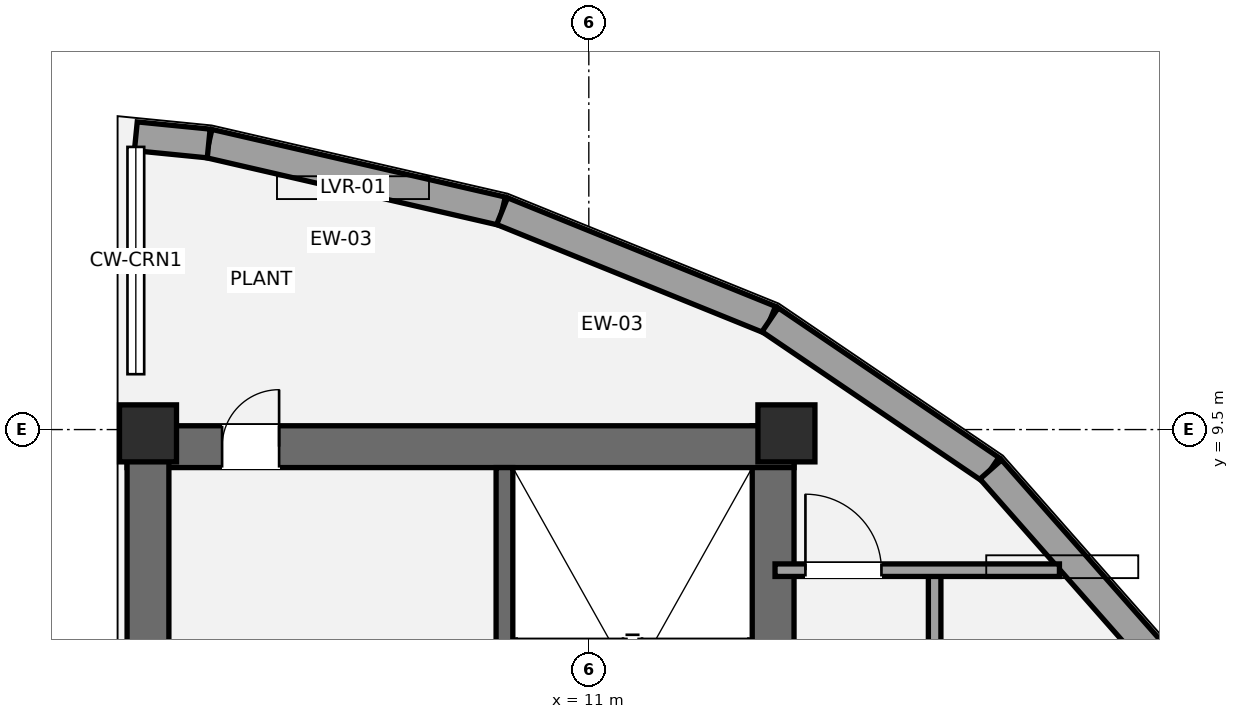
"""IFC4 building model, lengths in metres.
Left out: names, types, materials, properties, quantities, classifications, styles, units other than length and angle.
Written with IfcOpenShell. Run it as: python <this file> out.ifc"""

import sys

from ifc_helpers import new_model, si_unit, direction, frame, frame_2d, origin, origin_2d, place, context, subcontext, project, spatial, rectangle, extrude, element, fill, save


model = new_model("IFC4")
c1 = context("Model", 3, precision=1e-05, world=origin(), true_north=direction((0.0, 1.0)))
c2 = subcontext(c1, "Body", "Model", "MODEL_VIEW")
j1 = project(units=[si_unit("LENGTHUNIT", "METRE"), si_unit("PLANEANGLEUNIT", "RADIAN")], contexts=[c1])
p1 = place(None, origin())
s1 = spatial("IfcSite", under=j1, at=p1, CompositionType="ELEMENT")
p2 = place(p1, origin())
s2 = spatial("IfcBuilding", under=s1, at=p2, CompositionType="ELEMENT")
p3 = place(p2, frame((0.0, 0.0, 276.8)))
s3 = spatial("IfcBuildingStorey", under=s2, at=p3, CompositionType="ELEMENT", Elevation=276.8)
p4 = place(p3, frame((13.425, 1.3, 0.0), z_axis=(0.0, 0.0, 1.0), x_axis=(0.0, 1.0, 0.0)))
e1 = element("IfcWall", 1, at=p4, inside=s3, PredefinedType="SHEAR", context=c2, shape_type="SweptSolid", body=[
    extrude(rectangle(XDim=8.25, YDim=0.55, at=frame_2d((4.125, 0.0))), origin(), (0.0, 0.0, 1.0), 3.8),
])
p5 = place(p3, frame((4.925, 9.275, 0.0), z_axis=(0.0, 0.0, 1.0), x_axis=(1.0, 0.0, 0.0)))
e2 = element("IfcWall", 2, at=p5, inside=s3, PredefinedType="SHEAR", context=c2, shape_type="SweptSolid", body=[
    extrude(rectangle(XDim=8.775, YDim=0.55, at=frame_2d((4.387, 0.0))), origin(), (0.0, 0.0, 1.0), 3.8),
])
p6 = place(p5, frame((1.25, 0.0, 0.0)))
e3 = element("IfcOpeningElement", 3, at=p6, cuts=e2, PredefinedType="OPENING", context=c2, shape_type="SweptSolid", body=[
    extrude(rectangle(XDim=0.75, YDim=2.1, at=frame_2d((0.375, 1.05))), frame((0.0, 0.285, 0.0), z_axis=(0.0, -1.0, 0.0), x_axis=(1.0, 0.0, 0.0)), (0.0, 0.0, 1.0), 0.57),
])
p7 = place(p3, frame((5.2, 1.3, 0.0), z_axis=(0.0, 0.0, 1.0), x_axis=(0.0, 1.0, 0.0)))
e4 = element("IfcWall", 4, at=p7, inside=s3, PredefinedType="SHEAR", context=c2, shape_type="SweptSolid", body=[
    extrude(rectangle(XDim=8.25, YDim=0.55, at=frame_2d((4.125, 0.0))), origin(), (0.0, 0.0, 1.0), 3.8),
])
p8 = place(p3, frame((9.89, 1.85, 0.0), z_axis=(0.0, 0.0, 1.0), x_axis=(0.0, 1.0, 0.0)))
e5 = element("IfcWall", 5, at=p8, inside=s3, PredefinedType="SHEAR", context=c2, shape_type="SweptSolid", body=[
    extrude(rectangle(XDim=7.15, YDim=0.22, at=frame_2d((3.575, 0.0))), origin(), (0.0, 0.0, 1.0), 3.8),
])
for number, where, z_axis, x_axis in (
    (6, (5.2, 9.45, 0.0), (0.0, 0.0, 1.0), (1.0, 0.0, 0.0)),
    (7, (13.6, 9.45, 0.0), (0.0, 0.0, 1.0), (1.0, 0.0, 0.0)),
):
    element("IfcColumn", number, at=place(p3, frame(where, z_axis=z_axis, x_axis=x_axis)), inside=s3, PredefinedType="PILASTER", context=c2, shape_type="SweptSolid", body=[
        extrude(rectangle(XDim=0.75, YDim=0.75, at=origin_2d()), origin(), (0.0, 0.0, 1.0), 3.8),
    ])
p9 = place(p3, frame((9.859, 12.374, 0.0), z_axis=(0.0, 0.0, 1.0), x_axis=(-0.974441030185, 0.224643447918, 0.0)))
e8 = element("IfcWall", 8, at=p9, inside=s3, PredefinedType="ELEMENTEDWALL", context=c2, shape_type="SweptSolid", body=[
    extrude(rectangle(XDim=3.961, YDim=0.38, at=frame_2d((1.981, 0.0))), origin(), (0.0, 0.0, 1.0), 2.97),
])
p10 = place(p3, frame((13.385, 10.945, 0.0), z_axis=(0.0, 0.0, 1.0), x_axis=(-0.926776699004, 0.375612766268, 0.0)))
e9 = element("IfcWall", 9, at=p10, inside=s3, PredefinedType="ELEMENTEDWALL", context=c2, shape_type="SweptSolid", body=[
    extrude(rectangle(XDim=3.805, YDim=0.38, at=frame_2d((1.902, 0.0))), origin(), (0.0, 0.0, 1.0), 2.97),
])
p11 = place(p3, frame((16.289, 8.975, 0.0), z_axis=(0.0, 0.0, 1.0), x_axis=(-0.827558908117, 0.561378885955, 0.0)))
e10 = element("IfcWall", 10, at=p11, inside=s3, PredefinedType="ELEMENTEDWALL", context=c2, shape_type="SweptSolid", body=[
    extrude(rectangle(XDim=3.508, YDim=0.38, at=frame_2d((1.754, 0.0))), origin(), (0.0, 0.0, 1.0), 2.97),
])
p12 = place(p3, frame((18.379, 6.602, 0.0), z_axis=(0.0, 0.0, 1.0), x_axis=(-0.660965358004, 0.750416414745, 0.0)))
e11 = element("IfcWall", 11, at=p12, inside=s3, PredefinedType="ELEMENTEDWALL", context=c2, shape_type="SweptSolid", body=[
    extrude(rectangle(XDim=3.163, YDim=0.38, at=frame_2d((1.582, 0.0))), origin(), (0.0, 0.0, 1.0), 2.97),
])
p13 = place(p3, frame((5.999, 13.264, 0.0), z_axis=(0.0, 0.0, 1.0), x_axis=(-0.995154416473, 0.098324398674, 0.0)))
e12 = element("IfcWall", 12, at=p13, inside=s3, PredefinedType="ELEMENTEDWALL", context=c2, shape_type="SweptSolid", body=[
    extrude(rectangle(XDim=0.963, YDim=0.38, at=frame_2d((0.482, 0.0))), origin(), (0.0, 0.0, 1.0), 2.97),
])
p14 = place(p3, frame((15.55, -7.05, 0.0), z_axis=(0.0, 0.0, 1.0), x_axis=(0.0, 1.0, 0.0)))
e13 = element("IfcWall", 13, at=p14, inside=s3, PredefinedType="PARTITIONING", context=c2, shape_type="SweptSolid", body=[
    extrude(rectangle(XDim=14.7, YDim=0.165, at=frame_2d((7.35, 0.0))), origin(), (0.0, 0.0, 1.0), 2.987),
])
p15 = place(p14, frame((1.8, 0.0, 0.0)))
e14 = element("IfcOpeningElement", 14, at=p15, cuts=e13, PredefinedType="OPENING", context=c2, shape_type="SweptSolid", body=[
    extrude(rectangle(XDim=1.0, YDim=2.15, at=frame_2d((0.5, 1.075))), frame((0.0, 0.093, 0.0), z_axis=(0.0, -1.0, 0.0), x_axis=(1.0, 0.0, 0.0)), (0.0, 0.0, 1.0), 0.185),
])
p16 = place(p14, frame((7.28, 0.0, 0.0)))
e15 = element("IfcOpeningElement", 15, at=p16, cuts=e13, PredefinedType="OPENING", context=c2, shape_type="SweptSolid", body=[
    extrude(rectangle(XDim=1.0, YDim=2.15, at=frame_2d((0.5, 1.075))), frame((0.0, 0.093, 0.0), z_axis=(0.0, -1.0, 0.0), x_axis=(1.0, 0.0, 0.0)), (0.0, 0.0, 1.0), 0.185),
])
p17 = place(p14, frame((11.6, 0.0, 0.0)))
e16 = element("IfcOpeningElement", 16, at=p17, cuts=e13, PredefinedType="OPENING", context=c2, shape_type="SweptSolid", body=[
    extrude(rectangle(XDim=1.0, YDim=2.15, at=frame_2d((0.5, 1.075))), frame((0.0, 0.093, 0.0), z_axis=(0.0, -1.0, 0.0), x_axis=(1.0, 0.0, 0.0)), (0.0, 0.0, 1.0), 0.185),
])
p18 = place(p3, frame((13.45, 7.65, 0.0), z_axis=(0.0, 0.0, 1.0), x_axis=(1.0, 0.0, 0.0)))
e17 = element("IfcWall", 17, at=p18, inside=s3, PredefinedType="PARTITIONING", context=c2, shape_type="SweptSolid", body=[
    extrude(rectangle(XDim=3.742, YDim=0.165, at=frame_2d((1.871, 0.0))), origin(), (0.0, 0.0, 1.0), 2.968),
])
p19 = place(p18, frame((0.4, 0.0, 0.0)))
e18 = element("IfcOpeningElement", 18, at=p19, cuts=e17, PredefinedType="OPENING", context=c2, shape_type="SweptSolid", body=[
    extrude(rectangle(XDim=1.0, YDim=2.15, at=frame_2d((0.5, 1.075))), frame((0.0, 0.093, 0.0), z_axis=(0.0, -1.0, 0.0), x_axis=(1.0, 0.0, 0.0)), (0.0, 0.0, 1.0), 0.185),
])
p20 = place(p6, origin())
e19 = element("IfcDoor", 19, at=p20, inside=s3, OperationType="SINGLE_SWING_RIGHT", PredefinedType="DOOR", context=c2, shape_type="SweptSolid", body=[
    extrude(rectangle(XDim=0.75, YDim=2.1, at=frame_2d((0.375, 1.05))), frame((0.0, 0.025, 0.0), z_axis=(0.0, -1.0, 0.0), x_axis=(1.0, 0.0, 0.0)), (0.0, 0.0, 1.0), 0.05),
])
fill(e3, e19)
p21 = place(p19, origin())
e20 = element("IfcDoor", 20, at=p21, inside=s3, OperationType="SINGLE_SWING_LEFT", PredefinedType="DOOR", context=c2, shape_type="SweptSolid", body=[
    extrude(rectangle(XDim=1.0, YDim=2.15, at=frame_2d((0.5, 1.075))), frame((0.0, 0.025, 0.0), z_axis=(0.0, -1.0, 0.0), x_axis=(1.0, 0.0, 0.0)), (0.0, 0.0, 1.0), 0.05),
])
fill(e18, e20)
save(model, sys.argv[1])
